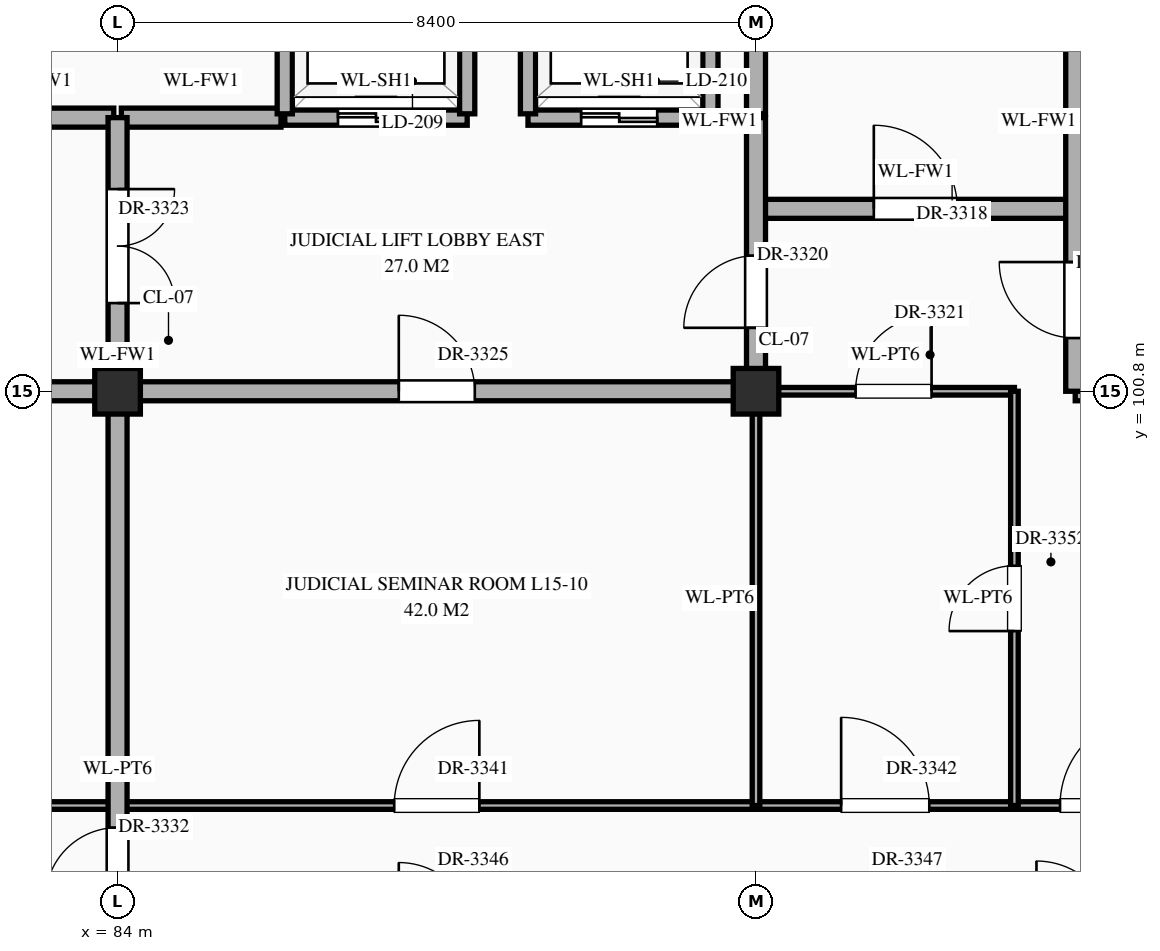
"""IFC4 building model, lengths in metres.
Left out: names, types, materials, properties, quantities, classifications, styles, units other than length and angle.
Written with IfcOpenShell. Run it as: python <this file> out.ifc"""

import sys

from ifc_helpers import new_model, si_unit, direction, frame, frame_2d, origin, origin_2d, place, context, subcontext, project, spatial, rectangle, extrude, element, fill, save


model = new_model("IFC4")
c1 = context("Model", 3, precision=1e-05, world=origin(), true_north=direction((0.0, 1.0)))
c2 = subcontext(c1, "Body", "Model", "MODEL_VIEW")
j1 = project(units=[si_unit("LENGTHUNIT", "METRE"), si_unit("PLANEANGLEUNIT", "RADIAN")], contexts=[c1])
p1 = place(None, origin())
s1 = spatial("IfcSite", under=j1, at=p1, CompositionType="ELEMENT")
p2 = place(p1, origin())
s2 = spatial("IfcBuilding", under=s1, at=p2, CompositionType="ELEMENT")
p3 = place(p2, frame((0.0, 0.0, 64.5)))
s3 = spatial("IfcBuildingStorey", under=s2, at=p3, CompositionType="ELEMENT", Elevation=64.5)
for number, where, z_axis, x_axis in (
    (1, (84.0, 100.8, 0.0), (0.0, 0.0, 1.0), (1.0, 0.0, 0.0)),
    (2, (92.4, 100.8, 0.0), (0.0, 0.0, 1.0), (1.0, 0.0, 0.0)),
):
    element("IfcColumn", number, at=place(p3, frame(where, z_axis=z_axis, x_axis=x_axis)), inside=s3, PredefinedType="COLUMN", context=c2, shape_type="SweptSolid", body=[
        extrude(rectangle(XDim=0.6, YDim=0.6, at=origin_2d()), origin(), (0.0, 0.0, 1.0), 4.2),
    ])
p4 = place(p3, frame((58.84, 95.35, 0.0), z_axis=(0.0, 0.0, 1.0), x_axis=(1.0, 0.0, 0.0)))
e3 = element("IfcWall", 3, at=p4, inside=s3, PredefinedType="STANDARD", context=c2, shape_type="SweptSolid", body=[
    extrude(rectangle(XDim=50.32, YDim=0.1, at=frame_2d((25.16, 0.0))), origin(), (0.0, 0.0, 1.0), 3.95),
])
p5 = place(p4, frame((3.61, 0.0, 0.0)))
e4 = element("IfcOpeningElement", 4, at=p5, cuts=e3, PredefinedType="OPENING", context=c2, shape_type="SweptSolid", body=[
    extrude(rectangle(XDim=1.14, YDim=2.4, at=frame_2d((0.57, 1.2))), frame((0.0, 0.062, 0.0), z_axis=(0.0, -1.0, 0.0), x_axis=(1.0, 0.0, 0.0)), (0.0, 0.0, 1.0), 0.124),
])
p6 = place(p4, frame((9.61, 0.0, 0.0)))
e5 = element("IfcOpeningElement", 5, at=p6, cuts=e3, PredefinedType="OPENING", context=c2, shape_type="SweptSolid", body=[
    extrude(rectangle(XDim=0.9, YDim=2.15, at=frame_2d((0.45, 1.075))), frame((0.0, 0.062, 0.0), z_axis=(0.0, -1.0, 0.0), x_axis=(1.0, 0.0, 0.0)), (0.0, 0.0, 1.0), 0.124),
])
p7 = place(p4, frame((12.53, 0.0, 0.0)))
e6 = element("IfcOpeningElement", 6, at=p7, cuts=e3, PredefinedType="OPENING", context=c2, shape_type="SweptSolid", body=[
    extrude(rectangle(XDim=0.86, YDim=2.1, at=frame_2d((0.43, 1.05))), frame((0.0, 0.062, 0.0), z_axis=(0.0, -1.0, 0.0), x_axis=(1.0, 0.0, 0.0)), (0.0, 0.0, 1.0), 0.124),
])
p8 = place(p4, frame((15.0, 0.0, 0.0)))
e7 = element("IfcOpeningElement", 7, at=p8, cuts=e3, PredefinedType="OPENING", context=c2, shape_type="SweptSolid", body=[
    extrude(rectangle(XDim=0.92, YDim=2.15, at=frame_2d((0.46, 1.075))), frame((0.0, 0.062, 0.0), z_axis=(0.0, -1.0, 0.0), x_axis=(1.0, 0.0, 0.0)), (0.0, 0.0, 1.0), 0.124),
])
p9 = place(p4, frame((20.48, 0.0, 0.0)))
e8 = element("IfcOpeningElement", 8, at=p9, cuts=e3, PredefinedType="OPENING", context=c2, shape_type="SweptSolid", body=[
    extrude(rectangle(XDim=0.96, YDim=2.2, at=frame_2d((0.48, 1.1))), frame((0.0, 0.062, 0.0), z_axis=(0.0, -1.0, 0.0), x_axis=(1.0, 0.0, 0.0)), (0.0, 0.0, 1.0), 0.124),
])
p10 = place(p4, frame((28.8, 0.0, 0.0)))
e9 = element("IfcOpeningElement", 9, at=p10, cuts=e3, PredefinedType="OPENING", context=c2, shape_type="SweptSolid", body=[
    extrude(rectangle(XDim=1.12, YDim=2.25, at=frame_2d((0.56, 1.125))), frame((0.0, 0.062, 0.0), z_axis=(0.0, -1.0, 0.0), x_axis=(1.0, 0.0, 0.0)), (0.0, 0.0, 1.0), 0.124),
])
p11 = place(p4, frame((34.68, 0.0, 0.0)))
e10 = element("IfcOpeningElement", 10, at=p11, cuts=e3, PredefinedType="OPENING", context=c2, shape_type="SweptSolid", body=[
    extrude(rectangle(XDim=1.16, YDim=2.3, at=frame_2d((0.58, 1.15))), frame((0.0, 0.062, 0.0), z_axis=(0.0, -1.0, 0.0), x_axis=(1.0, 0.0, 0.0)), (0.0, 0.0, 1.0), 0.124),
])
p12 = place(p4, frame((37.56, 0.0, 0.0)))
e11 = element("IfcOpeningElement", 11, at=p12, cuts=e3, PredefinedType="OPENING", context=c2, shape_type="SweptSolid", body=[
    extrude(rectangle(XDim=1.2, YDim=2.35, at=frame_2d((0.6, 1.175))), frame((0.0, 0.062, 0.0), z_axis=(0.0, -1.0, 0.0), x_axis=(1.0, 0.0, 0.0)), (0.0, 0.0, 1.0), 0.124),
])
p13 = place(p4, frame((40.04, 0.0, 0.0)))
e12 = element("IfcOpeningElement", 12, at=p13, cuts=e3, PredefinedType="OPENING", context=c2, shape_type="SweptSolid", body=[
    extrude(rectangle(XDim=1.24, YDim=2.3, at=frame_2d((0.62, 1.15))), frame((0.0, 0.062, 0.0), z_axis=(0.0, -1.0, 0.0), x_axis=(1.0, 0.0, 0.0)), (0.0, 0.0, 1.0), 0.124),
])
p14 = place(p4, frame((45.5, 0.0, 0.0)))
e13 = element("IfcOpeningElement", 13, at=p14, cuts=e3, PredefinedType="OPENING", context=c2, shape_type="SweptSolid", body=[
    extrude(rectangle(XDim=1.28, YDim=2.35, at=frame_2d((0.64, 1.175))), frame((0.0, 0.062, 0.0), z_axis=(0.0, -1.0, 0.0), x_axis=(1.0, 0.0, 0.0)), (0.0, 0.0, 1.0), 0.124),
])
p15 = place(p3, frame((75.6, 100.8, 0.0), z_axis=(0.0, 0.0, 1.0), x_axis=(1.0, 0.0, 0.0)))
e14 = element("IfcWall", 14, at=p15, inside=s3, PredefinedType="STANDARD", context=c2, shape_type="SweptSolid", body=[
    extrude(rectangle(XDim=16.8, YDim=0.25, at=frame_2d((8.4, 0.0))), origin(), (0.0, 0.0, 1.0), 3.1),
])
p16 = place(p15, frame((3.65, 0.0, 0.0)))
e15 = element("IfcOpeningElement", 15, at=p16, cuts=e14, PredefinedType="OPENING", context=c2, shape_type="SweptSolid", body=[
    extrude(rectangle(XDim=1.1, YDim=2.2, at=frame_2d((0.55, 1.1))), frame((0.0, 0.137, 0.0), z_axis=(0.0, -1.0, 0.0), x_axis=(1.0, 0.0, 0.0)), (0.0, 0.0, 1.0), 0.274),
])
p17 = place(p15, frame((12.1, 0.0, 0.0)))
e16 = element("IfcOpeningElement", 16, at=p17, cuts=e14, PredefinedType="OPENING", context=c2, shape_type="SweptSolid", body=[
    extrude(rectangle(XDim=1.0, YDim=2.2, at=frame_2d((0.5, 1.1))), frame((0.0, 0.137, 0.0), z_axis=(0.0, -1.0, 0.0), x_axis=(1.0, 0.0, 0.0)), (0.0, 0.0, 1.0), 0.274),
])
p18 = place(p3, frame((92.4, 100.8, 0.0), z_axis=(0.0, 0.0, 1.0), x_axis=(1.0, 0.0, 0.0)))
e17 = element("IfcWall", 17, at=p18, inside=s3, PredefinedType="STANDARD", context=c2, shape_type="SweptSolid", body=[
    extrude(rectangle(XDim=3.4, YDim=0.1, at=frame_2d((1.7, 0.0))), origin(), (0.0, 0.0, 1.0), 3.1),
])
p19 = place(p18, frame((1.31, 0.0, 0.0)))
e18 = element("IfcOpeningElement", 18, at=p19, cuts=e17, PredefinedType="OPENING", context=c2, shape_type="SweptSolid", body=[
    extrude(rectangle(XDim=1.0, YDim=2.25, at=frame_2d((0.5, 1.125))), frame((0.0, 0.062, 0.0), z_axis=(0.0, -1.0, 0.0), x_axis=(1.0, 0.0, 0.0)), (0.0, 0.0, 1.0), 0.124),
])
p20 = place(p3, frame((96.6, 100.8, 0.0), z_axis=(0.0, 0.0, 1.0), x_axis=(1.0, 0.0, 0.0)))
e19 = element("IfcWall", 19, at=p20, inside=s3, PredefinedType="STANDARD", context=c2, shape_type="SweptSolid", body=[
    extrude(rectangle(XDim=12.56, YDim=0.25, at=frame_2d((6.28, 0.0))), origin(), (0.0, 0.0, 1.0), 3.1),
])
p21 = place(p20, frame((7.925, 0.0, 0.0)))
e20 = element("IfcOpeningElement", 20, at=p21, cuts=e19, PredefinedType="OPENING", context=c2, shape_type="SweptSolid", body=[
    extrude(rectangle(XDim=0.95, YDim=2.15, at=frame_2d((0.475, 1.075))), frame((0.0, 0.137, 0.0), z_axis=(0.0, -1.0, 0.0), x_axis=(1.0, 0.0, 0.0)), (0.0, 0.0, 1.0), 0.274),
])
p22 = place(p20, frame((0.3, 0.0, 0.0)))
e21 = element("IfcOpeningElement", 21, at=p22, cuts=e19, PredefinedType="OPENING", context=c2, shape_type="SweptSolid", body=[
    extrude(rectangle(XDim=1.0, YDim=2.2, at=frame_2d((0.5, 1.1))), frame((0.0, 0.137, 0.0), z_axis=(0.0, -1.0, 0.0), x_axis=(1.0, 0.0, 0.0)), (0.0, 0.0, 1.0), 0.274),
])
p23 = place(p3, frame((92.4, 103.2, 0.0), z_axis=(0.0, 0.0, 1.0), x_axis=(1.0, 0.0, 0.0)))
e22 = element("IfcWall", 22, at=p23, inside=s3, PredefinedType="STANDARD", context=c2, shape_type="SweptSolid", body=[
    extrude(rectangle(XDim=4.2, YDim=0.25, at=frame_2d((2.1, 0.0))), origin(), (0.0, 0.0, 1.0), 3.95),
])
p24 = place(p23, frame((1.55, 0.0, 0.0)))
e23 = element("IfcOpeningElement", 23, at=p24, cuts=e22, PredefinedType="OPENING", context=c2, shape_type="SweptSolid", body=[
    extrude(rectangle(XDim=1.1, YDim=2.2, at=frame_2d((0.55, 1.1))), frame((0.0, 0.137, 0.0), z_axis=(0.0, -1.0, 0.0), x_axis=(1.0, 0.0, 0.0)), (0.0, 0.0, 1.0), 0.274),
])
for number, where, z_axis, x_axis in (
    (24, (81.85, 104.4, 0.0), (0.0, 0.0, 1.0), (1.0, 0.0, 0.0)),
    (25, (84.05, 104.4, 0.0), (0.0, 0.0, 1.0), (1.0, 0.0, 0.0)),
):
    element("IfcWall", number, at=place(p3, frame(where, z_axis=z_axis, x_axis=x_axis)), inside=s3, PredefinedType="STANDARD", context=c2, shape_type="SweptSolid", body=[
        extrude(rectangle(XDim=2.1, YDim=0.25, at=frame_2d((1.05, 0.0))), origin(), (0.0, 0.0, 1.0), 3.95),
    ])
p25 = place(p3, frame((86.2, 104.4, 0.0), z_axis=(0.0, 0.0, 1.0), x_axis=(1.0, 0.0, 0.0)))
e26 = element("IfcWall", 26, at=p25, inside=s3, PredefinedType="STANDARD", context=c2, shape_type="SweptSolid", body=[
    extrude(rectangle(XDim=2.4, YDim=0.2, at=frame_2d((1.2, 0.0))), origin(), (0.0, 0.0, 1.0), 3.95),
])
p26 = place(p25, frame((0.7, 0.0, 0.0)))
e27 = element("IfcOpeningElement", 27, at=p26, cuts=e26, PredefinedType="OPENING", context=c2, shape_type="SweptSolid", body=[
    extrude(rectangle(XDim=1.0, YDim=2.15, at=frame_2d((0.5, 1.075))), frame((0.0, 0.112, 0.0), z_axis=(0.0, -1.0, 0.0), x_axis=(1.0, 0.0, 0.0)), (0.0, 0.0, 1.0), 0.224),
])
p27 = place(p3, frame((89.4, 104.4, 0.0), z_axis=(0.0, 0.0, 1.0), x_axis=(1.0, 0.0, 0.0)))
e28 = element("IfcWall", 28, at=p27, inside=s3, PredefinedType="STANDARD", context=c2, shape_type="SweptSolid", body=[
    extrude(rectangle(XDim=2.4, YDim=0.2, at=frame_2d((1.2, 0.0))), origin(), (0.0, 0.0, 1.0), 3.95),
])
p28 = place(p27, frame((0.7, 0.0, 0.0)))
e29 = element("IfcOpeningElement", 29, at=p28, cuts=e28, PredefinedType="OPENING", context=c2, shape_type="SweptSolid", body=[
    extrude(rectangle(XDim=1.0, YDim=2.15, at=frame_2d((0.5, 1.075))), frame((0.0, 0.112, 0.0), z_axis=(0.0, -1.0, 0.0), x_axis=(1.0, 0.0, 0.0)), (0.0, 0.0, 1.0), 0.224),
])
p29 = place(p3, frame((84.0, 79.24, 0.0), z_axis=(0.0, 0.0, 1.0), x_axis=(0.0, 1.0, 0.0)))
e30 = element("IfcWall", 30, at=p29, inside=s3, PredefinedType="STANDARD", context=c2, shape_type="SweptSolid", body=[
    extrude(rectangle(XDim=25.16, YDim=0.25, at=frame_2d((12.58, 0.0))), origin(), (0.0, 0.0, 1.0), 3.1),
])
p30 = place(p29, frame((22.72, 0.0, 0.0)))
e31 = element("IfcOpeningElement", 31, at=p30, cuts=e30, PredefinedType="OPENING", context=c2, shape_type="SweptSolid", body=[
    extrude(rectangle(XDim=1.5, YDim=2.25, at=frame_2d((0.75, 1.125))), frame((0.0, 0.137, 0.0), z_axis=(0.0, -1.0, 0.0), x_axis=(1.0, 0.0, 0.0)), (0.0, 0.0, 1.0), 0.274),
])
p31 = place(p29, frame((12.55, 0.0, 0.0)))
e32 = element("IfcOpeningElement", 32, at=p31, cuts=e30, PredefinedType="OPENING", context=c2, shape_type="SweptSolid", body=[
    extrude(rectangle(XDim=1.0, YDim=2.2, at=frame_2d((0.5, 1.1))), frame((0.0, 0.137, 0.0), z_axis=(0.0, -1.0, 0.0), x_axis=(1.0, 0.0, 0.0)), (0.0, 0.0, 1.0), 0.274),
])
p32 = place(p29, frame((14.87, 0.0, 0.0)))
e33 = element("IfcOpeningElement", 33, at=p32, cuts=e30, PredefinedType="OPENING", context=c2, shape_type="SweptSolid", body=[
    extrude(rectangle(XDim=0.95, YDim=2.15, at=frame_2d((0.475, 1.075))), frame((0.0, 0.137, 0.0), z_axis=(0.0, -1.0, 0.0), x_axis=(1.0, 0.0, 0.0)), (0.0, 0.0, 1.0), 0.274),
])
p33 = place(p29, frame((5.7, 0.0, 0.0)))
e34 = element("IfcOpeningElement", 34, at=p33, cuts=e30, PredefinedType="OPENING", context=c2, shape_type="SweptSolid", body=[
    extrude(rectangle(XDim=0.95, YDim=2.15, at=frame_2d((0.475, 1.075))), frame((0.0, 0.137, 0.0), z_axis=(0.0, -1.0, 0.0), x_axis=(1.0, 0.0, 0.0)), (0.0, 0.0, 1.0), 0.274),
])
for number, where, z_axis, x_axis in (
    (35, (86.2, 104.45, 0.0), (0.0, 0.0, 1.0), (0.0, 1.0, 0.0)),
    (36, (88.6, 104.45, 0.0), (0.0, 0.0, 1.0), (0.0, 1.0, 0.0)),
    (37, (89.4, 104.45, 0.0), (0.0, 0.0, 1.0), (0.0, 1.0, 0.0)),
    (38, (91.8, 104.45, 0.0), (0.0, 0.0, 1.0), (0.0, 1.0, 0.0)),
):
    element("IfcWall", number, at=place(p3, frame(where, z_axis=z_axis, x_axis=x_axis)), inside=s3, PredefinedType="STANDARD", context=c2, shape_type="SweptSolid", body=[
        extrude(rectangle(XDim=2.3, YDim=0.2, at=frame_2d((1.15, 0.0))), origin(), (0.0, 0.0, 1.0), 3.95),
    ])
p34 = place(p3, frame((92.4, 95.35, 0.0), z_axis=(0.0, 0.0, 1.0), x_axis=(0.0, 1.0, 0.0)))
e39 = element("IfcWall", 39, at=p34, inside=s3, PredefinedType="STANDARD", context=c2, shape_type="SweptSolid", body=[
    extrude(rectangle(XDim=5.45, YDim=0.1, at=frame_2d((2.725, 0.0))), origin(), (0.0, 0.0, 1.0), 3.2),
])
p35 = place(p3, frame((92.4, 100.8, 0.0), z_axis=(0.0, 0.0, 1.0), x_axis=(0.0, 1.0, 0.0)))
e40 = element("IfcWall", 40, at=p35, inside=s3, PredefinedType="STANDARD", context=c2, shape_type="SweptSolid", body=[
    extrude(rectangle(XDim=3.6, YDim=0.25, at=frame_2d((1.8, 0.0))), origin(), (0.0, 0.0, 1.0), 3.2),
])
p36 = place(p35, frame((0.835, 0.0, 0.0)))
e41 = element("IfcOpeningElement", 41, at=p36, cuts=e40, PredefinedType="OPENING", context=c2, shape_type="SweptSolid", body=[
    extrude(rectangle(XDim=0.95, YDim=2.15, at=frame_2d((0.475, 1.075))), frame((0.0, 0.137, 0.0), z_axis=(0.0, -1.0, 0.0), x_axis=(1.0, 0.0, 0.0)), (0.0, 0.0, 1.0), 0.274),
])
p37 = place(p3, frame((92.4, 104.45, 0.0), z_axis=(0.0, 0.0, 1.0), x_axis=(0.0, 1.0, 0.0)))
e42 = element("IfcWall", 42, at=p37, inside=s3, PredefinedType="STANDARD", context=c2, shape_type="SweptSolid", body=[
    extrude(rectangle(XDim=3.46, YDim=0.25, at=frame_2d((1.73, 0.0))), origin(), (0.0, 0.0, 1.0), 3.2),
])
p38 = place(p3, frame((95.8, 95.35, 0.0), z_axis=(0.0, 0.0, 1.0), x_axis=(0.0, 1.0, 0.0)))
e43 = element("IfcWall", 43, at=p38, inside=s3, PredefinedType="STANDARD", context=c2, shape_type="SweptSolid", body=[
    extrude(rectangle(XDim=5.45, YDim=0.1, at=frame_2d((2.725, 0.0))), origin(), (0.0, 0.0, 1.0), 3.95),
])
p39 = place(p38, frame((2.295, 0.0, 0.0)))
e44 = element("IfcOpeningElement", 44, at=p39, cuts=e43, PredefinedType="OPENING", context=c2, shape_type="SweptSolid", body=[
    extrude(rectangle(XDim=0.86, YDim=2.1, at=frame_2d((0.43, 1.05))), frame((0.0, 0.062, 0.0), z_axis=(0.0, -1.0, 0.0), x_axis=(1.0, 0.0, 0.0)), (0.0, 0.0, 1.0), 0.124),
])
p40 = place(p3, frame((96.6, 100.8, 0.0), z_axis=(0.0, 0.0, 1.0), x_axis=(0.0, 1.0, 0.0)))
e45 = element("IfcWall", 45, at=p40, inside=s3, PredefinedType="STANDARD", context=c2, shape_type="SweptSolid", body=[
    extrude(rectangle(XDim=3.6, YDim=0.25, at=frame_2d((1.8, 0.0))), origin(), (0.0, 0.0, 1.0), 3.95),
])
p41 = place(p40, frame((0.7, 0.0, 0.0)))
e46 = element("IfcOpeningElement", 46, at=p41, cuts=e45, PredefinedType="OPENING", context=c2, shape_type="SweptSolid", body=[
    extrude(rectangle(XDim=1.0, YDim=2.2, at=frame_2d((0.5, 1.1))), frame((0.0, 0.137, 0.0), z_axis=(0.0, -1.0, 0.0), x_axis=(1.0, 0.0, 0.0)), (0.0, 0.0, 1.0), 0.274),
])
p42 = place(p3, frame((96.6, 104.45, 0.0), z_axis=(0.0, 0.0, 1.0), x_axis=(0.0, 1.0, 0.0)))
e47 = element("IfcWall", 47, at=p42, inside=s3, PredefinedType="STANDARD", context=c2, shape_type="SweptSolid", body=[
    extrude(rectangle(XDim=3.46, YDim=0.25, at=frame_2d((1.73, 0.0))), origin(), (0.0, 0.0, 1.0), 3.95),
])
p43 = place(p26, origin())
e48 = element("IfcDoor", 48, at=p43, inside=s3, OperationType="DOUBLE_DOOR_SLIDING", PredefinedType="DOOR", context=c2, shape_type="SweptSolid", body=[
    extrude(rectangle(XDim=1.0, YDim=2.15, at=frame_2d((0.5, 1.075))), frame((0.0, 0.025, 0.0), z_axis=(0.0, -1.0, 0.0), x_axis=(1.0, 0.0, 0.0)), (0.0, 0.0, 1.0), 0.05),
])
fill(e27, e48)
p44 = place(p28, origin())
e49 = element("IfcDoor", 49, at=p44, inside=s3, OperationType="DOUBLE_DOOR_SLIDING", PredefinedType="DOOR", context=c2, shape_type="SweptSolid", body=[
    extrude(rectangle(XDim=1.0, YDim=2.15, at=frame_2d((0.5, 1.075))), frame((0.0, 0.025, 0.0), z_axis=(0.0, -1.0, 0.0), x_axis=(1.0, 0.0, 0.0)), (0.0, 0.0, 1.0), 0.05),
])
fill(e29, e49)
p45 = place(p24, origin())
e50 = element("IfcDoor", 50, at=p45, inside=s3, OperationType="SINGLE_SWING_LEFT", PredefinedType="DOOR", context=c2, shape_type="SweptSolid", body=[
    extrude(rectangle(XDim=1.1, YDim=2.2, at=frame_2d((0.55, 1.1))), frame((0.0, 0.025, 0.0), z_axis=(0.0, -1.0, 0.0), x_axis=(1.0, 0.0, 0.0)), (0.0, 0.0, 1.0), 0.05),
])
fill(e23, e50)
p46 = place(p41, origin())
e51 = element("IfcDoor", 51, at=p46, inside=s3, OperationType="SINGLE_SWING_RIGHT", PredefinedType="DOOR", context=c2, shape_type="SweptSolid", body=[
    extrude(rectangle(XDim=1.0, YDim=2.2, at=frame_2d((0.5, 1.1))), frame((0.0, 0.025, 0.0), z_axis=(0.0, -1.0, 0.0), x_axis=(1.0, 0.0, 0.0)), (0.0, 0.0, 1.0), 0.05),
])
fill(e46, e51)
p47 = place(p36, origin())
e52 = element("IfcDoor", 52, at=p47, inside=s3, OperationType="SINGLE_SWING_LEFT", PredefinedType="DOOR", context=c2, shape_type="SweptSolid", body=[
    extrude(rectangle(XDim=0.95, YDim=2.15, at=frame_2d((0.475, 1.075))), frame((0.0, 0.025, 0.0), z_axis=(0.0, -1.0, 0.0), x_axis=(1.0, 0.0, 0.0)), (0.0, 0.0, 1.0), 0.05),
])
fill(e41, e52)
p48 = place(p19, origin())
e53 = element("IfcDoor", 53, at=p48, inside=s3, OperationType="SINGLE_SWING_RIGHT", PredefinedType="DOOR", context=c2, shape_type="SweptSolid", body=[
    extrude(rectangle(XDim=1.0, YDim=2.25, at=frame_2d((0.5, 1.125))), frame((0.0, 0.025, 0.0), z_axis=(0.0, -1.0, 0.0), x_axis=(1.0, 0.0, 0.0)), (0.0, 0.0, 1.0), 0.05),
])
fill(e18, e53)
p49 = place(p30, frame((1.5, 0.0, 0.0), z_axis=(0.0, 0.0, 1.0), x_axis=(-1.0, 0.0, 0.0)))
e54 = element("IfcDoor", 54, at=p49, inside=s3, OperationType="DOUBLE_DOOR_SINGLE_SWING", PredefinedType="DOOR", context=c2, shape_type="SweptSolid", body=[
    extrude(rectangle(XDim=1.5, YDim=2.25, at=frame_2d((0.75, 1.125))), frame((0.0, 0.025, 0.0), z_axis=(0.0, -1.0, 0.0), x_axis=(1.0, 0.0, 0.0)), (0.0, 0.0, 1.0), 0.05),
])
fill(e31, e54)
p50 = place(p17, origin())
e55 = element("IfcDoor", 55, at=p50, inside=s3, OperationType="SINGLE_SWING_LEFT", PredefinedType="DOOR", context=c2, shape_type="SweptSolid", body=[
    extrude(rectangle(XDim=1.0, YDim=2.2, at=frame_2d((0.5, 1.1))), frame((0.0, 0.025, 0.0), z_axis=(0.0, -1.0, 0.0), x_axis=(1.0, 0.0, 0.0)), (0.0, 0.0, 1.0), 0.05),
])
fill(e16, e55)
p51 = place(p32, origin())
e56 = element("IfcDoor", 56, at=p51, inside=s3, OperationType="SINGLE_SWING_LEFT", PredefinedType="DOOR", context=c2, shape_type="SweptSolid", body=[
    extrude(rectangle(XDim=0.95, YDim=2.15, at=frame_2d((0.475, 1.075))), frame((0.0, 0.025, 0.0), z_axis=(0.0, -1.0, 0.0), x_axis=(1.0, 0.0, 0.0)), (0.0, 0.0, 1.0), 0.05),
])
fill(e33, e56)
p52 = place(p10, origin())
e57 = element("IfcDoor", 57, at=p52, inside=s3, OperationType="SINGLE_SWING_RIGHT", PredefinedType="DOOR", context=c2, shape_type="SweptSolid", body=[
    extrude(rectangle(XDim=1.12, YDim=2.25, at=frame_2d((0.56, 1.125))), frame((0.0, 0.025, 0.0), z_axis=(0.0, -1.0, 0.0), x_axis=(1.0, 0.0, 0.0)), (0.0, 0.0, 1.0), 0.05),
])
fill(e9, e57)
p53 = place(p11, origin())
e58 = element("IfcDoor", 58, at=p53, inside=s3, OperationType="SINGLE_SWING_LEFT", PredefinedType="DOOR", context=c2, shape_type="SweptSolid", body=[
    extrude(rectangle(XDim=1.16, YDim=2.3, at=frame_2d((0.58, 1.15))), frame((0.0, 0.025, 0.0), z_axis=(0.0, -1.0, 0.0), x_axis=(1.0, 0.0, 0.0)), (0.0, 0.0, 1.0), 0.05),
])
fill(e10, e58)
p54 = place(p12, origin())
e59 = element("IfcDoor", 59, at=p54, inside=s3, OperationType="SINGLE_SWING_RIGHT", PredefinedType="DOOR", context=c2, shape_type="SweptSolid", body=[
    extrude(rectangle(XDim=1.2, YDim=2.35, at=frame_2d((0.6, 1.175))), frame((0.0, 0.025, 0.0), z_axis=(0.0, -1.0, 0.0), x_axis=(1.0, 0.0, 0.0)), (0.0, 0.0, 1.0), 0.05),
])
fill(e11, e59)
p55 = place(p39, origin())
e60 = element("IfcDoor", 60, at=p55, inside=s3, OperationType="SINGLE_SWING_LEFT", PredefinedType="DOOR", context=c2, shape_type="SweptSolid", body=[
    extrude(rectangle(XDim=0.86, YDim=2.1, at=frame_2d((0.43, 1.05))), frame((0.0, 0.025, 0.0), z_axis=(0.0, -1.0, 0.0), x_axis=(1.0, 0.0, 0.0)), (0.0, 0.0, 1.0), 0.05),
])
fill(e44, e60)
save(model, sys.argv[1])
